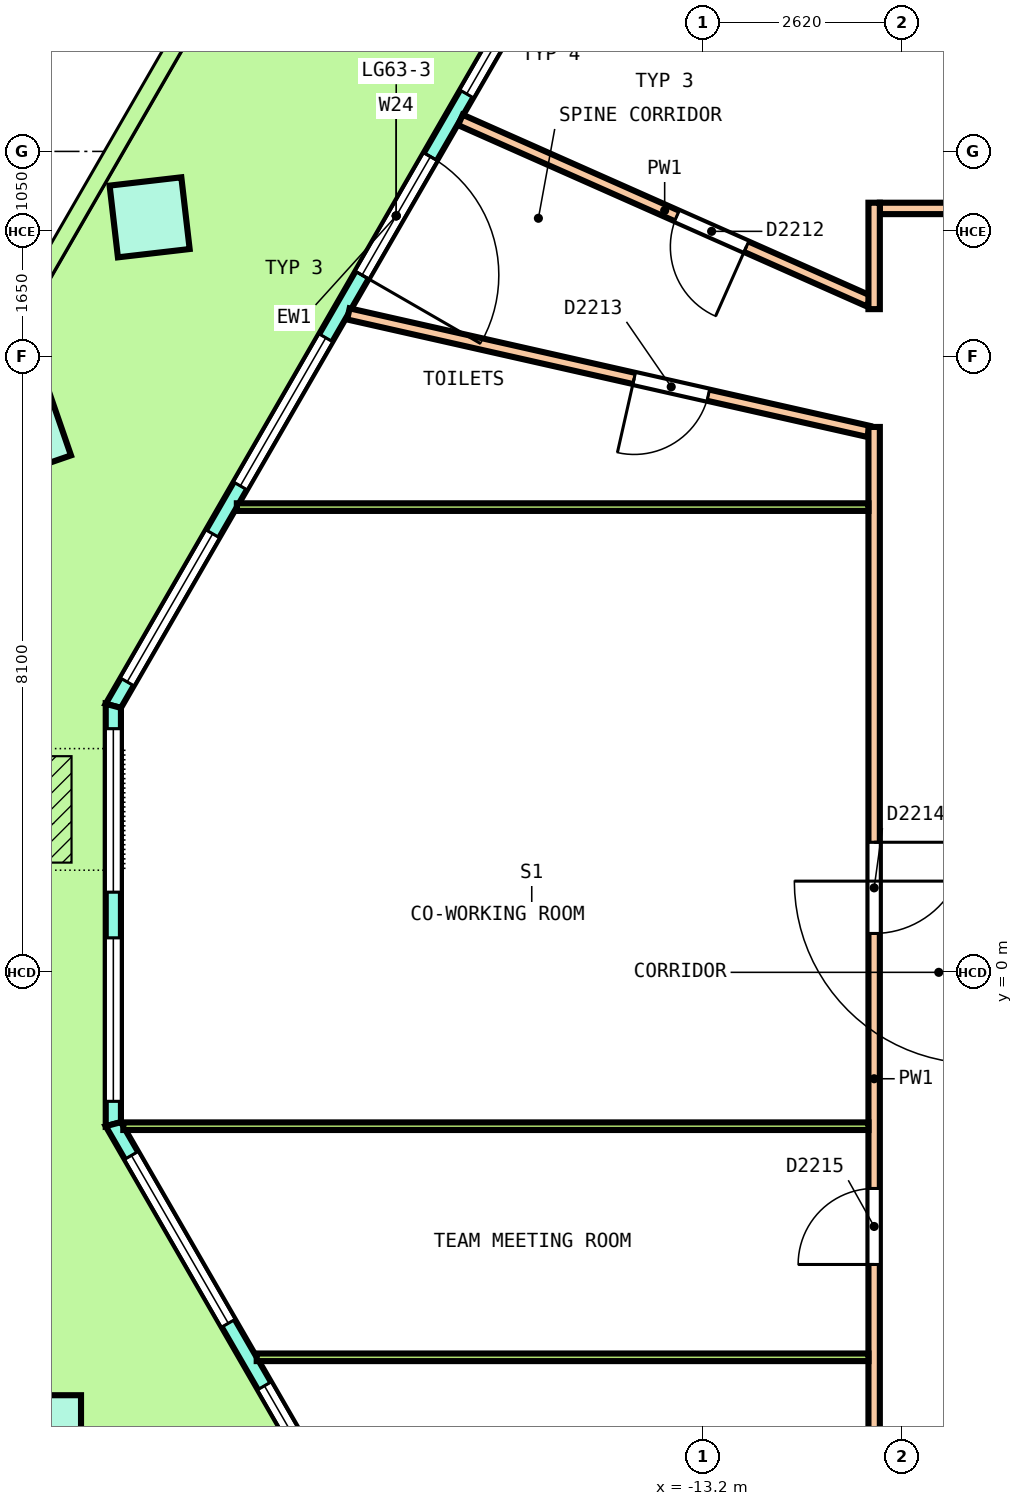
"""IFC4 building model, lengths in metres.
Left out: names, types, materials, properties, quantities, classifications, styles, units other than length and angle.
Written with IfcOpenShell. Run it as: python <this file> out.ifc"""

import sys

from ifc_helpers import new_model, si_unit, direction, frame, frame_2d, origin, origin_2d, place, context, subcontext, project, spatial, polyline, rectangle, outline, extrude, element, fill, save


model = new_model("IFC4")
c1 = context("Model", 3, precision=1e-05, world=origin(), true_north=direction((0.0, 1.0)))
c2 = subcontext(c1, "Body", "Model", "MODEL_VIEW")
j1 = project(units=[si_unit("LENGTHUNIT", "METRE"), si_unit("PLANEANGLEUNIT", "RADIAN")], contexts=[c1])
p1 = place(None, origin())
s1 = spatial("IfcSite", under=j1, at=p1, CompositionType="ELEMENT")
p2 = place(p1, origin())
s2 = spatial("IfcBuilding", under=s1, at=p2, CompositionType="ELEMENT")
p3 = place(p2, frame((0.0, 0.0, 287.0)))
s3 = spatial("IfcBuildingStorey", under=s2, at=p3, CompositionType="ELEMENT", Elevation=287.0)
p4 = place(p3, frame((-20.482, 9.933, 0.0), z_axis=(-0.025405336763, 0.018853434124, 0.999499433159), x_axis=(-0.499535386528, -0.866285820665, 0.003643421709)))
e1 = element("IfcColumn", 1, at=p4, inside=s3, PredefinedType="COLUMN", context=c2, shape_type="SweptSolid", body=[
    extrude(rectangle(XDim=0.95, YDim=0.95, at=origin_2d()), origin(), (0.0, 0.0, 1.0), 3.652),
])
p5 = place(p3, frame((-22.121, 7.094, 0.0), z_axis=(-0.021727128018, 0.025136615799, 0.999447888814), x_axis=(-0.501407060892, -0.86514336922, 0.010858636257)))
e2 = element("IfcColumn", 2, at=p5, inside=s3, PredefinedType="COLUMN", context=c2, shape_type="SweptSolid", body=[
    extrude(rectangle(XDim=0.95, YDim=0.95, at=origin_2d()), origin(), (0.0, 0.0, 1.0), 3.652),
])
p6 = place(p3, frame((-21.859, -6.039, 0.0), z_axis=(-0.010833557325, 0.018858414602, 0.999763469144), x_axis=(0.498285075857, -0.866740432575, 0.0217486946)))
e3 = element("IfcColumn", 3, at=p6, inside=s3, PredefinedType="COLUMN", context=c2, shape_type="SweptSolid", body=[
    extrude(rectangle(XDim=0.95, YDim=0.95, at=origin_2d()), origin(), (0.0, 0.0, 1.0), 3.651),
])
p7 = place(p3, frame((-13.516, 16.398, 0.0), z_axis=(0.0, 0.0, 1.0), x_axis=(-0.499998331335, -0.866026367187, 0.0)))
e4 = element("IfcWall", 4, at=p7, inside=s3, PredefinedType="SOLIDWALL", context=c2, shape_type="SweptSolid", body=[
    extrude(outline(polyline([(-0.027, -0.1), (1.04, -0.1), (2.107, -0.1), (3.175, -0.1), (4.242, -0.1), (5.309, -0.1), (6.376, -0.1), (7.443, -0.1), (8.51, -0.1), (9.578, -0.1), (10.645, -0.1), (11.712, -0.1), (12.779, -0.1), (13.846, -0.1), (14.914, -0.1), (14.86, 0.1), (13.8, 0.1), (12.741, 0.1), (11.681, 0.1), (10.622, 0.1), (9.562, 0.1), (8.503, 0.1), (7.443, 0.1), (6.384, 0.1), (5.324, 0.1), (4.265, 0.1), (3.205, 0.1), (2.146, 0.1), (1.086, 0.1), (0.027, 0.1), (-0.027, -0.1)])), origin(), (0.0, 0.0, 1.0), 3.7),
])
p8 = place(p7, frame((0.364, 0.0, 0.1)))
e5 = element("IfcOpeningElement", 5, at=p8, cuts=e4, PredefinedType="OPENING", context=c2, shape_type="SweptSolid", body=[
    extrude(rectangle(XDim=2.25, YDim=2.75, at=frame_2d((1.125, 1.375))), frame((0.0, 0.11, 0.0), z_axis=(0.0, -1.0, 0.0), x_axis=(1.0, 0.0, 0.0)), (0.0, 0.0, 1.0), 0.22),
])
p9 = place(p7, frame((3.341, 0.0, 0.1)))
e6 = element("IfcOpeningElement", 6, at=p9, cuts=e4, PredefinedType="OPENING", context=c2, shape_type="SweptSolid", body=[
    extrude(rectangle(XDim=2.25, YDim=2.75, at=frame_2d((1.125, 1.375))), frame((0.0, 0.11, 0.0), z_axis=(0.0, -1.0, 0.0), x_axis=(1.0, 0.0, 0.0)), (0.0, 0.0, 1.0), 0.22),
])
p10 = place(p7, frame((6.543, 0.0, 0.0)))
e7 = element("IfcOpeningElement", 7, at=p10, cuts=e4, PredefinedType="OPENING", context=c2, shape_type="SweptSolid", body=[
    extrude(rectangle(XDim=1.8, YDim=2.4, at=frame_2d((0.9, 1.2))), frame((0.0, 0.11, 0.0), z_axis=(0.0, -1.0, 0.0), x_axis=(1.0, 0.0, 0.0)), (0.0, 0.0, 1.0), 0.22),
])
p11 = place(p7, frame((6.543, 0.0, 2.55)))
e8 = element("IfcOpeningElement", 8, at=p11, cuts=e4, PredefinedType="OPENING", context=c2, shape_type="SweptSolid", body=[
    extrude(rectangle(XDim=1.8, YDim=0.3, at=frame_2d((0.9, 0.15))), frame((0.0, 0.11, 0.0), z_axis=(0.0, -1.0, 0.0), x_axis=(1.0, 0.0, 0.0)), (0.0, 0.0, 1.0), 0.22),
])
p12 = place(p7, frame((9.296, 0.0, 0.1)))
e9 = element("IfcOpeningElement", 9, at=p12, cuts=e4, PredefinedType="OPENING", context=c2, shape_type="SweptSolid", body=[
    extrude(rectangle(XDim=2.25, YDim=2.75, at=frame_2d((1.125, 1.375))), frame((0.0, 0.11, 0.0), z_axis=(0.0, -1.0, 0.0), x_axis=(1.0, 0.0, 0.0)), (0.0, 0.0, 1.0), 0.22),
])
p13 = place(p7, frame((12.273, 0.0, 0.1)))
e10 = element("IfcOpeningElement", 10, at=p13, cuts=e4, PredefinedType="OPENING", context=c2, shape_type="SweptSolid", body=[
    extrude(rectangle(XDim=2.25, YDim=2.75, at=frame_2d((1.125, 1.375))), frame((0.0, 0.11, 0.0), z_axis=(0.0, -1.0, 0.0), x_axis=(1.0, 0.0, 0.0)), (0.0, 0.0, 1.0), 0.22),
])
p14 = place(p3, frame((-20.959, 3.506, 0.0), z_axis=(0.0, 0.0, 1.0), x_axis=(0.0, -1.0, 0.0)))
e11 = element("IfcWall", 11, at=p14, inside=s3, PredefinedType="SOLIDWALL", context=c2, shape_type="SweptSolid", body=[
    extrude(outline(polyline([(-0.027, -0.1), (1.084, -0.1), (2.196, -0.1), (3.307, -0.1), (4.419, -0.1), (5.53, -0.1), (5.477, 0.1), (4.387, 0.1), (3.297, 0.1), (2.207, 0.1), (1.117, 0.1), (0.027, 0.1), (-0.027, -0.1)])), origin(), (0.0, 0.0, 1.0), 3.7),
])
p15 = place(p14, frame((0.301, 0.0, 0.1)))
e12 = element("IfcOpeningElement", 12, at=p15, cuts=e11, PredefinedType="OPENING", context=c2, shape_type="SweptSolid", body=[
    extrude(rectangle(XDim=2.15, YDim=2.75, at=frame_2d((1.075, 1.375))), frame((0.0, 0.11, 0.0), z_axis=(0.0, -1.0, 0.0), x_axis=(1.0, 0.0, 0.0)), (0.0, 0.0, 1.0), 0.22),
])
p16 = place(p14, frame((3.052, 0.0, 0.1)))
e13 = element("IfcOpeningElement", 13, at=p16, cuts=e11, PredefinedType="OPENING", context=c2, shape_type="SweptSolid", body=[
    extrude(rectangle(XDim=2.15, YDim=2.75, at=frame_2d((1.075, 1.375))), frame((0.0, 0.11, 0.0), z_axis=(0.0, -1.0, 0.0), x_axis=(1.0, 0.0, 0.0)), (0.0, 0.0, 1.0), 0.22),
])
p17 = place(p3, frame((-20.959, -1.998, 0.0), z_axis=(0.0, 0.0, 1.0), x_axis=(0.499999812077, -0.866025512282, 0.0)))
e14 = element("IfcWall", 14, at=p17, inside=s3, PredefinedType="SOLIDWALL", context=c2, shape_type="SweptSolid", body=[
    extrude(outline(polyline([(-0.027, -0.1), (1.006, -0.1), (2.038, -0.1), (3.071, -0.1), (4.103, -0.1), (5.136, -0.1), (6.168, -0.1), (7.201, -0.1), (8.233, -0.1), (9.266, -0.1), (10.299, -0.1), (11.331, -0.1), (12.364, -0.1), (13.396, -0.1), (14.429, -0.1), (15.461, -0.1), (16.494, -0.1), (17.526, -0.1), (17.473, 0.1), (16.447, 0.1), (15.42, 0.1), (14.394, 0.1), (13.368, 0.1), (12.342, 0.1), (11.315, 0.1), (10.289, 0.1), (9.263, 0.1), (8.237, 0.1), (7.21, 0.1), (6.184, 0.1), (5.158, 0.1), (4.132, 0.1), (3.105, 0.1), (2.079, 0.1), (1.053, 0.1), (0.027, 0.1), (-0.027, -0.1)])), origin(), (0.0, 0.0, 1.0), 3.7),
])
p18 = place(p17, frame((0.475, 0.0, 0.1)))
e15 = element("IfcOpeningElement", 15, at=p18, cuts=e14, PredefinedType="OPENING", context=c2, shape_type="SweptSolid", body=[
    extrude(rectangle(XDim=2.55, YDim=2.75, at=frame_2d((1.275, 1.375))), frame((0.0, 0.11, 0.0), z_axis=(0.0, -1.0, 0.0), x_axis=(1.0, 0.0, 0.0)), (0.0, 0.0, 1.0), 0.22),
])
p19 = place(p17, frame((3.975, 0.0, 0.1)))
e16 = element("IfcOpeningElement", 16, at=p19, cuts=e14, PredefinedType="OPENING", context=c2, shape_type="SweptSolid", body=[
    extrude(rectangle(XDim=2.55, YDim=2.75, at=frame_2d((1.275, 1.375))), frame((0.0, 0.11, 0.0), z_axis=(0.0, -1.0, 0.0), x_axis=(1.0, 0.0, 0.0)), (0.0, 0.0, 1.0), 0.22),
])
p20 = place(p17, frame((7.85, 0.0, 0.0)))
e17 = element("IfcOpeningElement", 17, at=p20, cuts=e14, PredefinedType="OPENING", context=c2, shape_type="SweptSolid", body=[
    extrude(rectangle(XDim=1.8, YDim=2.4, at=frame_2d((0.9, 1.2))), frame((0.0, 0.11, 0.0), z_axis=(0.0, -1.0, 0.0), x_axis=(1.0, 0.0, 0.0)), (0.0, 0.0, 1.0), 0.22),
])
p21 = place(p17, frame((7.85, 0.0, 2.55)))
e18 = element("IfcOpeningElement", 18, at=p21, cuts=e14, PredefinedType="OPENING", context=c2, shape_type="SweptSolid", body=[
    extrude(rectangle(XDim=1.8, YDim=0.3, at=frame_2d((0.9, 0.15))), frame((0.0, 0.11, 0.0), z_axis=(0.0, -1.0, 0.0), x_axis=(1.0, 0.0, 0.0)), (0.0, 0.0, 1.0), 0.22),
])
p22 = place(p17, frame((10.975, 0.0, 0.1)))
e19 = element("IfcOpeningElement", 19, at=p22, cuts=e14, PredefinedType="OPENING", context=c2, shape_type="SweptSolid", body=[
    extrude(rectangle(XDim=2.55, YDim=2.75, at=frame_2d((1.275, 1.375))), frame((0.0, 0.11, 0.0), z_axis=(0.0, -1.0, 0.0), x_axis=(1.0, 0.0, 0.0)), (0.0, 0.0, 1.0), 0.22),
])
p23 = place(p17, frame((14.475, 0.0, 0.1)))
e20 = element("IfcOpeningElement", 20, at=p23, cuts=e14, PredefinedType="OPENING", context=c2, shape_type="SweptSolid", body=[
    extrude(rectangle(XDim=2.55, YDim=2.75, at=frame_2d((1.275, 1.375))), frame((0.0, 0.11, 0.0), z_axis=(0.0, -1.0, 0.0), x_axis=(1.0, 0.0, 0.0)), (0.0, 0.0, 1.0), 0.22),
])
p24 = place(p3, frame((-16.393, 11.214, 0.0), z_axis=(0.0, 0.0, 1.0), x_axis=(0.914110944559, -0.405464155059, 0.0)))
e21 = element("IfcWall", 21, at=p24, inside=s3, PredefinedType="PARTITIONING", context=c2, shape_type="SweptSolid", body=[
    extrude(rectangle(XDim=5.88, YDim=0.15, at=frame_2d((2.94, 0.0))), origin(), (0.0, 0.0, 1.0), 2.9),
])
p25 = place(p24, frame((3.115, 0.0, 0.0)))
e22 = element("IfcOpeningElement", 22, at=p25, cuts=e21, PredefinedType="OPENING", context=c2, shape_type="SweptSolid", body=[
    extrude(rectangle(XDim=1.0, YDim=2.1, at=frame_2d((0.5, 1.05))), frame((0.0, 0.085, 0.0), z_axis=(0.0, -1.0, 0.0), x_axis=(1.0, 0.0, 0.0)), (0.0, 0.0, 1.0), 0.17),
])
p26 = place(p3, frame((-17.867, 8.662, 0.0), z_axis=(0.0, 0.0, 1.0), x_axis=(0.975432078053, -0.220300388347, 0.0)))
e23 = element("IfcWall", 23, at=p26, inside=s3, PredefinedType="PARTITIONING", context=c2, shape_type="SweptSolid", body=[
    extrude(rectangle(XDim=7.016, YDim=0.15, at=frame_2d((3.508, 0.0))), origin(), (0.0, 0.0, 1.0), 2.9),
])
p27 = place(p26, frame((3.854, 0.0, 0.0)))
e24 = element("IfcOpeningElement", 24, at=p27, cuts=e23, PredefinedType="OPENING", context=c2, shape_type="SweptSolid", body=[
    extrude(rectangle(XDim=1.0, YDim=2.1, at=frame_2d((0.5, 1.05))), frame((0.0, 0.085, 0.0), z_axis=(0.0, -1.0, 0.0), x_axis=(1.0, 0.0, 0.0)), (0.0, 0.0, 1.0), 0.17),
])
p28 = place(p3, frame((-10.875, 10.05, 0.0), z_axis=(0.0, 0.0, 1.0), x_axis=(1.0, 0.0, 0.0)))
e25 = element("IfcWall", 25, at=p28, inside=s3, PredefinedType="PARTITIONING", context=c2, shape_type="SweptSolid", body=[
    extrude(rectangle(XDim=21.775, YDim=0.15, at=frame_2d((10.887, 0.0))), origin(), (0.0, 0.0, 1.0), 2.9),
])
p29 = place(p28, frame((20.309, 0.0, 0.0)))
e26 = element("IfcOpeningElement", 26, at=p29, cuts=e25, PredefinedType="OPENING", context=c2, shape_type="SweptSolid", body=[
    extrude(rectangle(XDim=1.0, YDim=2.1, at=frame_2d((0.5, 1.05))), frame((0.0, 0.085, 0.0), z_axis=(0.0, -1.0, 0.0), x_axis=(1.0, 0.0, 0.0)), (0.0, 0.0, 1.0), 0.17),
])
p30 = place(p28, frame((16.309, 0.0, 0.0)))
e27 = element("IfcOpeningElement", 27, at=p30, cuts=e25, PredefinedType="OPENING", context=c2, shape_type="SweptSolid", body=[
    extrude(rectangle(XDim=1.2, YDim=2.1, at=frame_2d((0.6, 1.05))), frame((0.0, 0.085, 0.0), z_axis=(0.0, -1.0, 0.0), x_axis=(1.0, 0.0, 0.0)), (0.0, 0.0, 1.0), 0.17),
])
p31 = place(p28, frame((7.751, 0.0, 0.0)))
e28 = element("IfcOpeningElement", 28, at=p31, cuts=e25, PredefinedType="OPENING", context=c2, shape_type="SweptSolid", body=[
    extrude(rectangle(XDim=1.2, YDim=2.1, at=frame_2d((0.6, 1.05))), frame((0.0, 0.085, 0.0), z_axis=(0.0, -1.0, 0.0), x_axis=(1.0, 0.0, 0.0)), (0.0, 0.0, 1.0), 0.17),
])
p32 = place(p28, frame((2.901, 0.0, 0.0)))
e29 = element("IfcOpeningElement", 29, at=p32, cuts=e25, PredefinedType="OPENING", context=c2, shape_type="SweptSolid", body=[
    extrude(rectangle(XDim=1.0, YDim=2.1, at=frame_2d((0.5, 1.05))), frame((0.0, 0.085, 0.0), z_axis=(0.0, -1.0, 0.0), x_axis=(1.0, 0.0, 0.0)), (0.0, 0.0, 1.0), 0.17),
])
p33 = place(p3, frame((-10.95, -9.975, 0.0), z_axis=(0.0, 0.0, 1.0), x_axis=(0.0, 1.0, 0.0)))
e30 = element("IfcWall", 30, at=p33, inside=s3, PredefinedType="PARTITIONING", context=c2, shape_type="SweptSolid", body=[
    extrude(rectangle(XDim=17.15, YDim=0.15, at=frame_2d((8.575, 0.0))), origin(), (0.0, 0.0, 1.0), 2.9),
])
p34 = place(p33, frame((10.486, 0.0, 0.0)))
e31 = element("IfcOpeningElement", 31, at=p34, cuts=e30, PredefinedType="OPENING", context=c2, shape_type="SweptSolid", body=[
    extrude(rectangle(XDim=1.2, YDim=2.1, at=frame_2d((0.6, 1.05))), frame((0.0, 0.085, 0.0), z_axis=(0.0, -1.0, 0.0), x_axis=(1.0, 0.0, 0.0)), (0.0, 0.0, 1.0), 0.17),
])
p35 = place(p33, frame((6.132, 0.0, 0.0)))
e32 = element("IfcOpeningElement", 32, at=p35, cuts=e30, PredefinedType="OPENING", context=c2, shape_type="SweptSolid", body=[
    extrude(rectangle(XDim=1.0, YDim=2.1, at=frame_2d((0.5, 1.05))), frame((0.0, 0.085, 0.0), z_axis=(0.0, -1.0, 0.0), x_axis=(1.0, 0.0, 0.0)), (0.0, 0.0, 1.0), 0.17),
])
p36 = place(p33, frame((1.096, 0.0, 0.0)))
e33 = element("IfcOpeningElement", 33, at=p36, cuts=e30, PredefinedType="OPENING", context=c2, shape_type="SweptSolid", body=[
    extrude(rectangle(XDim=1.0, YDim=2.1, at=frame_2d((0.5, 1.05))), frame((0.0, 0.085, 0.0), z_axis=(0.0, -1.0, 0.0), x_axis=(1.0, 0.0, 0.0)), (0.0, 0.0, 1.0), 0.17),
])
p37 = place(p3, frame((-10.95, 8.725, 0.0), z_axis=(0.0, 0.0, 1.0), x_axis=(0.0, 1.0, 0.0)))
e34 = element("IfcWall", 34, at=p37, inside=s3, PredefinedType="PARTITIONING", context=c2, shape_type="SweptSolid", body=[
    extrude(rectangle(XDim=1.4, YDim=0.15, at=frame_2d((0.7, 0.0))), origin(), (0.0, 0.0, 1.0), 2.9),
])
p38 = place(p3, frame((-19.334, 6.121, 0.0), z_axis=(0.0, 0.0, 1.0), x_axis=(1.0, 0.0, 0.0)))
e35 = element("IfcWall", 35, at=p38, inside=s3, PredefinedType="PARTITIONING", context=c2, shape_type="SweptSolid", body=[
    extrude(rectangle(XDim=8.309, YDim=0.1, at=frame_2d((4.155, 0.0))), origin(), (0.0, 0.0, 1.0), 2.9),
])
p39 = place(p3, frame((-20.828, -2.024, 0.0), z_axis=(0.0, 0.0, 1.0), x_axis=(1.0, 0.0, 0.0)))
e36 = element("IfcWall", 36, at=p39, inside=s3, PredefinedType="PARTITIONING", context=c2, shape_type="SweptSolid", body=[
    extrude(rectangle(XDim=9.803, YDim=0.1, at=frame_2d((4.902, 0.0))), origin(), (0.0, 0.0, 1.0), 2.9),
])
p40 = place(p3, frame((-19.073, -5.065, 0.0), z_axis=(0.0, 0.0, 1.0), x_axis=(1.0, 0.0, 0.0)))
e37 = element("IfcWall", 37, at=p40, inside=s3, PredefinedType="PARTITIONING", context=c2, shape_type="SweptSolid", body=[
    extrude(rectangle(XDim=8.048, YDim=0.1, at=frame_2d((4.024, 0.0))), origin(), (0.0, 0.0, 1.0), 2.9),
])
p41 = place(p9, origin())
e38 = element("IfcWindow", 38, at=p41, inside=s3, PartitioningType="SINGLE_PANEL", PredefinedType="WINDOW", context=c2, shape_type="SweptSolid", body=[
    extrude(rectangle(XDim=2.25, YDim=2.75, at=frame_2d((1.125, 1.375))), frame((0.0, 0.03, 0.0), z_axis=(0.0, -1.0, 0.0), x_axis=(1.0, 0.0, 0.0)), (0.0, 0.0, 1.0), 0.06),
])
fill(e6, e38)
p42 = place(p10, origin())
e39 = element("IfcDoor", 39, at=p42, inside=s3, OperationType="DOUBLE_DOOR_SINGLE_SWING", PredefinedType="DOOR", context=c2, shape_type="SweptSolid", body=[
    extrude(rectangle(XDim=1.8, YDim=2.4, at=frame_2d((0.9, 1.2))), frame((0.0, 0.025, 0.0), z_axis=(0.0, -1.0, 0.0), x_axis=(1.0, 0.0, 0.0)), (0.0, 0.0, 1.0), 0.05),
])
fill(e7, e39)
p43 = place(p11, origin())
e40 = element("IfcWindow", 40, at=p43, inside=s3, PartitioningType="SINGLE_PANEL", PredefinedType="WINDOW", context=c2, shape_type="SweptSolid", body=[
    extrude(rectangle(XDim=1.8, YDim=0.3, at=frame_2d((0.9, 0.15))), frame((0.0, 0.03, 0.0), z_axis=(0.0, -1.0, 0.0), x_axis=(1.0, 0.0, 0.0)), (0.0, 0.0, 1.0), 0.06),
])
fill(e8, e40)
p44 = place(p12, origin())
e41 = element("IfcWindow", 41, at=p44, inside=s3, PartitioningType="SINGLE_PANEL", PredefinedType="WINDOW", context=c2, shape_type="SweptSolid", body=[
    extrude(rectangle(XDim=2.25, YDim=2.75, at=frame_2d((1.125, 1.375))), frame((0.0, 0.03, 0.0), z_axis=(0.0, -1.0, 0.0), x_axis=(1.0, 0.0, 0.0)), (0.0, 0.0, 1.0), 0.06),
])
fill(e9, e41)
p45 = place(p13, origin())
e42 = element("IfcWindow", 42, at=p45, inside=s3, PartitioningType="SINGLE_PANEL", PredefinedType="WINDOW", context=c2, shape_type="SweptSolid", body=[
    extrude(rectangle(XDim=2.25, YDim=2.75, at=frame_2d((1.125, 1.375))), frame((0.0, 0.03, 0.0), z_axis=(0.0, -1.0, 0.0), x_axis=(1.0, 0.0, 0.0)), (0.0, 0.0, 1.0), 0.06),
])
fill(e10, e42)
p46 = place(p15, origin())
e43 = element("IfcWindow", 43, at=p46, inside=s3, PartitioningType="SINGLE_PANEL", PredefinedType="WINDOW", context=c2, shape_type="SweptSolid", body=[
    extrude(rectangle(XDim=2.15, YDim=2.75, at=frame_2d((1.075, 1.375))), frame((0.0, 0.03, 0.0), z_axis=(0.0, -1.0, 0.0), x_axis=(1.0, 0.0, 0.0)), (0.0, 0.0, 1.0), 0.06),
])
fill(e12, e43)
p47 = place(p16, origin())
e44 = element("IfcWindow", 44, at=p47, inside=s3, PartitioningType="SINGLE_PANEL", PredefinedType="WINDOW", context=c2, shape_type="SweptSolid", body=[
    extrude(rectangle(XDim=2.15, YDim=2.75, at=frame_2d((1.075, 1.375))), frame((0.0, 0.03, 0.0), z_axis=(0.0, -1.0, 0.0), x_axis=(1.0, 0.0, 0.0)), (0.0, 0.0, 1.0), 0.06),
])
fill(e13, e44)
p48 = place(p18, origin())
e45 = element("IfcWindow", 45, at=p48, inside=s3, PartitioningType="SINGLE_PANEL", PredefinedType="WINDOW", context=c2, shape_type="SweptSolid", body=[
    extrude(rectangle(XDim=2.55, YDim=2.75, at=frame_2d((1.275, 1.375))), frame((0.0, 0.03, 0.0), z_axis=(0.0, -1.0, 0.0), x_axis=(1.0, 0.0, 0.0)), (0.0, 0.0, 1.0), 0.06),
])
fill(e15, e45)
p49 = place(p19, origin())
e46 = element("IfcWindow", 46, at=p49, inside=s3, PartitioningType="SINGLE_PANEL", PredefinedType="WINDOW", context=c2, shape_type="SweptSolid", body=[
    extrude(rectangle(XDim=2.55, YDim=2.75, at=frame_2d((1.275, 1.375))), frame((0.0, 0.03, 0.0), z_axis=(0.0, -1.0, 0.0), x_axis=(1.0, 0.0, 0.0)), (0.0, 0.0, 1.0), 0.06),
])
fill(e16, e46)
p50 = place(p25, origin())
e47 = element("IfcDoor", 47, at=p50, inside=s3, OperationType="SINGLE_SWING_LEFT", PredefinedType="DOOR", context=c2, shape_type="SweptSolid", body=[
    extrude(rectangle(XDim=1.0, YDim=2.1, at=frame_2d((0.5, 1.05))), frame((0.0, 0.025, 0.0), z_axis=(0.0, -1.0, 0.0), x_axis=(1.0, 0.0, 0.0)), (0.0, 0.0, 1.0), 0.05),
])
fill(e22, e47)
p51 = place(p27, origin())
e48 = element("IfcDoor", 48, at=p51, inside=s3, OperationType="SINGLE_SWING_LEFT", PredefinedType="DOOR", context=c2, shape_type="SweptSolid", body=[
    extrude(rectangle(XDim=1.0, YDim=2.1, at=frame_2d((0.5, 1.05))), frame((0.0, 0.025, 0.0), z_axis=(0.0, -1.0, 0.0), x_axis=(1.0, 0.0, 0.0)), (0.0, 0.0, 1.0), 0.05),
])
fill(e24, e48)
p52 = place(p34, origin())
e49 = element("IfcDoor", 49, at=p52, inside=s3, OperationType="DOUBLE_DOOR_SINGLE_SWING", PredefinedType="DOOR", context=c2, shape_type="SweptSolid", body=[
    extrude(rectangle(XDim=1.2, YDim=2.1, at=frame_2d((0.6, 1.05))), frame((0.0, 0.025, 0.0), z_axis=(0.0, -1.0, 0.0), x_axis=(1.0, 0.0, 0.0)), (0.0, 0.0, 1.0), 0.05),
])
fill(e31, e49)
p53 = place(p35, origin())
e50 = element("IfcDoor", 50, at=p53, inside=s3, OperationType="SINGLE_SWING_RIGHT", PredefinedType="DOOR", context=c2, shape_type="SweptSolid", body=[
    extrude(rectangle(XDim=1.0, YDim=2.1, at=frame_2d((0.5, 1.05))), frame((0.0, 0.025, 0.0), z_axis=(0.0, -1.0, 0.0), x_axis=(1.0, 0.0, 0.0)), (0.0, 0.0, 1.0), 0.05),
])
fill(e32, e50)
save(model, sys.argv[1])
